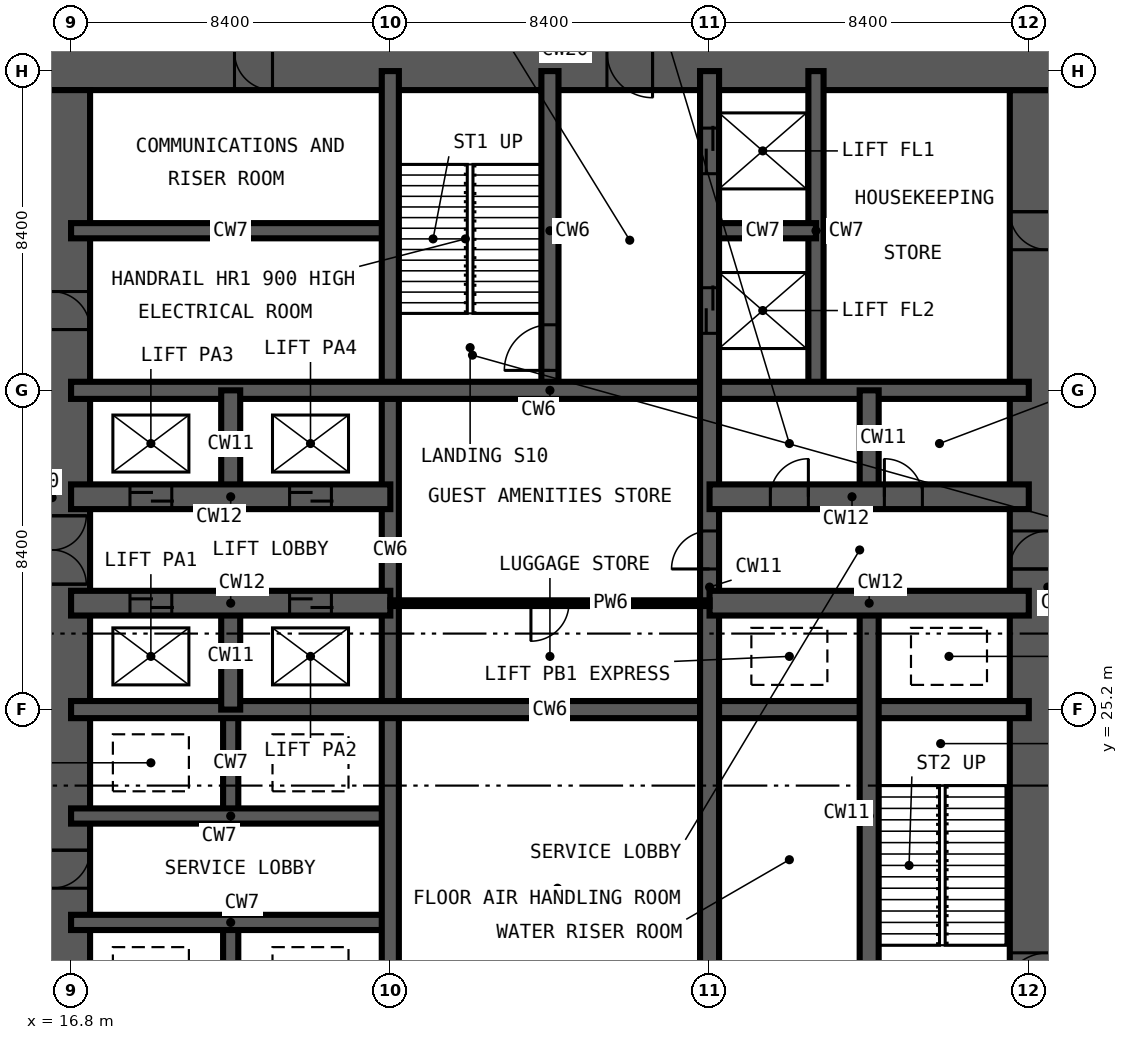
"""IFC4 building model, lengths in metres.
Left out: names, types, materials, properties, quantities, classifications, styles, units other than length and angle.
Written with IfcOpenShell. Run it as: python <this file> out.ifc"""

import sys

from ifc_helpers import new_model, si_unit, direction, frame, frame_2d, origin, place, context, subcontext, project, spatial, rectangle, extrude, element, fill, save


model = new_model("IFC4")
c1 = context("Model", 3, precision=1e-05, world=origin(), true_north=direction((0.0, 1.0)))
c2 = subcontext(c1, "Body", "Model", "MODEL_VIEW")
j1 = project(units=[si_unit("LENGTHUNIT", "METRE"), si_unit("PLANEANGLEUNIT", "RADIAN")], contexts=[c1])
p1 = place(None, origin())
s1 = spatial("IfcSite", under=j1, at=p1, CompositionType="ELEMENT")
p2 = place(p1, origin())
s2 = spatial("IfcBuilding", under=s1, at=p2, CompositionType="ELEMENT")
p3 = place(p2, frame((0.0, 0.0, 12.0)))
s3 = spatial("IfcBuildingStorey", under=s2, at=p3, CompositionType="ELEMENT", Elevation=12.0)
p4 = place(p3, frame((42.5, 17.3, -0.3), z_axis=(0.0, 0.0, 1.0), x_axis=(0.0, 1.0, 0.0)))
e1 = element("IfcWall", 1, at=p4, inside=s3, PredefinedType="SHEAR", context=c2, shape_type="SweptSolid", body=[
    extrude(rectangle(XDim=24.2, YDim=2.0, at=frame_2d((12.1, 0.0))), origin(), (0.0, 0.0, 1.0), 5.0),
])
p5 = place(p4, frame((0.3, 0.0, 0.3)))
e2 = element("IfcOpeningElement", 2, at=p5, cuts=e1, PredefinedType="OPENING", context=c2, shape_type="SweptSolid", body=[
    extrude(rectangle(XDim=1.2, YDim=2.2, at=frame_2d((0.6, 1.1))), frame((0.0, 1.01, 0.0), z_axis=(0.0, -1.0, 0.0), x_axis=(1.0, 0.0, 0.0)), (0.0, 0.0, 1.0), 2.02),
])
p6 = place(p4, frame((11.6, 0.0, 0.3)))
e3 = element("IfcOpeningElement", 3, at=p6, cuts=e1, PredefinedType="OPENING", context=c2, shape_type="SweptSolid", body=[
    extrude(rectangle(XDim=1.0, YDim=2.1, at=frame_2d((0.5, 1.05))), frame((0.0, 1.01, 0.0), z_axis=(0.0, -1.0, 0.0), x_axis=(1.0, 0.0, 0.0)), (0.0, 0.0, 1.0), 2.02),
])
p7 = place(p4, frame((20.0, 0.0, 0.3)))
e4 = element("IfcOpeningElement", 4, at=p7, cuts=e1, PredefinedType="OPENING", context=c2, shape_type="SweptSolid", body=[
    extrude(rectangle(XDim=1.0, YDim=2.1, at=frame_2d((0.5, 1.05))), frame((0.0, 1.01, 0.0), z_axis=(0.0, -1.0, 0.0), x_axis=(1.0, 0.0, 0.0)), (0.0, 0.0, 1.0), 2.02),
])
p8 = place(p3, frame((43.5, 42.5, -0.3), z_axis=(0.0, 0.0, 1.0), x_axis=(-1.0, 0.0, 0.0)))
e5 = element("IfcWall", 5, at=p8, inside=s3, PredefinedType="SHEAR", context=c2, shape_type="SweptSolid", body=[
    extrude(rectangle(XDim=28.2, YDim=2.0, at=frame_2d((14.1, 0.0))), origin(), (0.0, 0.0, 1.0), 5.0),
])
p9 = place(p8, frame((21.4, 0.0, 0.3)))
e6 = element("IfcOpeningElement", 6, at=p9, cuts=e5, PredefinedType="OPENING", context=c2, shape_type="SweptSolid", body=[
    extrude(rectangle(XDim=1.0, YDim=2.1, at=frame_2d((0.5, 1.05))), frame((0.0, 1.01, 0.0), z_axis=(0.0, -1.0, 0.0), x_axis=(1.0, 0.0, 0.0)), (0.0, 0.0, 1.0), 2.02),
])
p10 = place(p8, frame((11.4, 0.0, 0.3)))
e7 = element("IfcOpeningElement", 7, at=p10, cuts=e5, PredefinedType="OPENING", context=c2, shape_type="SweptSolid", body=[
    extrude(rectangle(XDim=1.2, YDim=2.2, at=frame_2d((0.6, 1.1))), frame((0.0, 1.01, 0.0), z_axis=(0.0, -1.0, 0.0), x_axis=(1.0, 0.0, 0.0)), (0.0, 0.0, 1.0), 2.02),
])
p11 = place(p3, frame((16.3, 41.5, -0.3), z_axis=(0.0, 0.0, 1.0), x_axis=(0.0, -1.0, 0.0)))
e8 = element("IfcWall", 8, at=p11, inside=s3, PredefinedType="SHEAR", context=c2, shape_type="SweptSolid", body=[
    extrude(rectangle(XDim=24.2, YDim=2.0, at=frame_2d((12.1, 0.0))), origin(), (0.0, 0.0, 1.0), 5.0),
])
p12 = place(p11, frame((11.2, 0.0, 0.3)))
e9 = element("IfcOpeningElement", 9, at=p12, cuts=e8, PredefinedType="OPENING", context=c2, shape_type="SweptSolid", body=[
    extrude(rectangle(XDim=1.8, YDim=2.2, at=frame_2d((0.9, 1.1))), frame((0.0, 1.01, 0.0), z_axis=(0.0, -1.0, 0.0), x_axis=(1.0, 0.0, 0.0)), (0.0, 0.0, 1.0), 2.02),
])
p13 = place(p11, frame((20.0, 0.0, 0.3)))
e10 = element("IfcOpeningElement", 10, at=p13, cuts=e8, PredefinedType="OPENING", context=c2, shape_type="SweptSolid", body=[
    extrude(rectangle(XDim=1.0, YDim=2.1, at=frame_2d((0.5, 1.05))), frame((0.0, 1.01, 0.0), z_axis=(0.0, -1.0, 0.0), x_axis=(1.0, 0.0, 0.0)), (0.0, 0.0, 1.0), 2.02),
])
p14 = place(p11, frame((5.3, 0.0, 0.3)))
e11 = element("IfcOpeningElement", 11, at=p14, cuts=e8, PredefinedType="OPENING", context=c2, shape_type="SweptSolid", body=[
    extrude(rectangle(XDim=1.0, YDim=2.1, at=frame_2d((0.5, 1.05))), frame((0.0, 1.01, 0.0), z_axis=(0.0, -1.0, 0.0), x_axis=(1.0, 0.0, 0.0)), (0.0, 0.0, 1.0), 2.02),
])
for number, where, z_axis, x_axis in (
    (12, (21.0, 16.8, -0.3), (0.0, 0.0, 1.0), (0.0, 1.0, 0.0)),
    (13, (21.0, 22.4, -0.3), (0.0, 0.0, 1.0), (0.0, 1.0, 0.0)),
):
    element("IfcWall", number, at=place(p3, frame(where, z_axis=z_axis, x_axis=x_axis)), inside=s3, PredefinedType="SHEAR", context=c2, shape_type="SweptSolid", body=[
        extrude(rectangle(XDim=2.8, YDim=0.4, at=frame_2d((1.4, 0.0))), origin(), (0.0, 0.0, 1.0), 5.0),
    ])
for number, where, z_axis, x_axis in (
    (14, (36.4, 33.6, -0.3), (0.0, 0.0, 1.0), (0.0, 1.0, 0.0)),
    (15, (16.8, 19.6, -0.3), (0.0, 0.0, 1.0), (1.0, 0.0, 0.0)),
    (16, (16.8, 22.4, -0.3), (0.0, 0.0, 1.0), (1.0, 0.0, 0.0)),
    (17, (16.8, 37.8, -0.3), (0.0, 0.0, 1.0), (1.0, 0.0, 0.0)),
):
    element("IfcWall", number, at=place(p3, frame(where, z_axis=z_axis, x_axis=x_axis)), inside=s3, PredefinedType="SHEAR", context=c2, shape_type="SweptSolid", body=[
        extrude(rectangle(XDim=8.4, YDim=0.4, at=frame_2d((4.2, 0.0))), origin(), (0.0, 0.0, 1.0), 5.0),
    ])
p15 = place(p3, frame((33.6, 37.8, -0.3), z_axis=(0.0, 0.0, 1.0), x_axis=(1.0, 0.0, 0.0)))
e18 = element("IfcWall", 18, at=p15, inside=s3, PredefinedType="SHEAR", context=c2, shape_type="SweptSolid", body=[
    extrude(rectangle(XDim=2.8, YDim=0.4, at=frame_2d((1.4, 0.0))), origin(), (0.0, 0.0, 1.0), 5.0),
])
p16 = place(p3, frame((25.2, 16.8, -0.3), z_axis=(0.0, 0.0, 1.0), x_axis=(0.0, 1.0, 0.0)))
e19 = element("IfcWall", 19, at=p16, inside=s3, PredefinedType="SHEAR", context=c2, shape_type="SweptSolid", body=[
    extrude(rectangle(XDim=25.2, YDim=0.45, at=frame_2d((12.6, 0.0))), origin(), (0.0, 0.0, 1.0), 5.0),
])
p17 = place(p3, frame((29.4, 33.6, -0.3), z_axis=(0.0, 0.0, 1.0), x_axis=(0.0, 1.0, 0.0)))
e20 = element("IfcWall", 20, at=p17, inside=s3, PredefinedType="SHEAR", context=c2, shape_type="SweptSolid", body=[
    extrude(rectangle(XDim=8.4, YDim=0.45, at=frame_2d((4.2, 0.0))), origin(), (0.0, 0.0, 1.0), 5.0),
])
p18 = place(p17, frame((0.525, 0.0, 0.3)))
e21 = element("IfcOpeningElement", 21, at=p18, cuts=e20, PredefinedType="OPENING", context=c2, shape_type="SweptSolid", body=[
    extrude(rectangle(XDim=1.2, YDim=2.2, at=frame_2d((0.6, 1.1))), frame((0.0, 0.235, 0.0), z_axis=(0.0, -1.0, 0.0), x_axis=(1.0, 0.0, 0.0)), (0.0, 0.0, 1.0), 0.47),
])
for number, where, z_axis, x_axis in (
    (22, (16.8, 25.2, -0.3), (0.0, 0.0, 1.0), (1.0, 0.0, 0.0)),
    (23, (16.8, 33.6, -0.3), (0.0, 0.0, 1.0), (1.0, 0.0, 0.0)),
):
    element("IfcWall", number, at=place(p3, frame(where, z_axis=z_axis, x_axis=x_axis)), inside=s3, PredefinedType="SHEAR", context=c2, shape_type="SweptSolid", body=[
        extrude(rectangle(XDim=25.2, YDim=0.45, at=frame_2d((12.6, 0.0))), origin(), (0.0, 0.0, 1.0), 5.0),
    ])
for number, where, z_axis, x_axis in (
    (24, (21.0, 25.2, -0.3), (0.0, 0.0, 1.0), (0.0, 1.0, 0.0)),
    (25, (21.0, 30.8, -0.3), (0.0, 0.0, 1.0), (0.0, 1.0, 0.0)),
):
    element("IfcWall", number, at=place(p3, frame(where, z_axis=z_axis, x_axis=x_axis)), inside=s3, PredefinedType="SHEAR", context=c2, shape_type="SweptSolid", body=[
        extrude(rectangle(XDim=2.8, YDim=0.5, at=frame_2d((1.4, 0.0))), origin(), (0.0, 0.0, 1.0), 5.0),
    ])
p19 = place(p3, frame((33.6, 16.8, -0.3), z_axis=(0.0, 0.0, 1.0), x_axis=(0.0, 1.0, 0.0)))
e26 = element("IfcWall", 26, at=p19, inside=s3, PredefinedType="SHEAR", context=c2, shape_type="SweptSolid", body=[
    extrude(rectangle(XDim=25.2, YDim=0.5, at=frame_2d((12.6, 0.0))), origin(), (0.0, 0.0, 1.0), 5.0),
])
p20 = place(p19, frame((22.5, 0.0, 0.3)))
e27 = element("IfcOpeningElement", 27, at=p20, cuts=e26, PredefinedType="OPENING", context=c2, shape_type="SweptSolid", body=[
    extrude(rectangle(XDim=1.2, YDim=2.2, at=frame_2d((0.6, 1.1))), frame((0.0, 0.26, 0.0), z_axis=(0.0, -1.0, 0.0), x_axis=(1.0, 0.0, 0.0)), (0.0, 0.0, 1.0), 0.52),
])
p21 = place(p19, frame((18.3, 0.0, 0.3)))
e28 = element("IfcOpeningElement", 28, at=p21, cuts=e26, PredefinedType="OPENING", context=c2, shape_type="SweptSolid", body=[
    extrude(rectangle(XDim=1.2, YDim=2.2, at=frame_2d((0.6, 1.1))), frame((0.0, 0.26, 0.0), z_axis=(0.0, -1.0, 0.0), x_axis=(1.0, 0.0, 0.0)), (0.0, 0.0, 1.0), 0.52),
])
p22 = place(p19, frame((12.1, 0.0, 0.3)))
e29 = element("IfcOpeningElement", 29, at=p22, cuts=e26, PredefinedType="OPENING", context=c2, shape_type="SweptSolid", body=[
    extrude(rectangle(XDim=1.0, YDim=2.1, at=frame_2d((0.5, 1.05))), frame((0.0, 0.26, 0.0), z_axis=(0.0, -1.0, 0.0), x_axis=(1.0, 0.0, 0.0)), (0.0, 0.0, 1.0), 0.52),
])
p23 = place(p3, frame((37.8, 16.8, -0.3), z_axis=(0.0, 0.0, 1.0), x_axis=(0.0, 1.0, 0.0)))
e30 = element("IfcWall", 30, at=p23, inside=s3, PredefinedType="SHEAR", context=c2, shape_type="SweptSolid", body=[
    extrude(rectangle(XDim=11.2, YDim=0.5, at=frame_2d((5.6, 0.0))), origin(), (0.0, 0.0, 1.0), 5.0),
])
p24 = place(p3, frame((37.8, 30.8, -0.3), z_axis=(0.0, 0.0, 1.0), x_axis=(0.0, 1.0, 0.0)))
e31 = element("IfcWall", 31, at=p24, inside=s3, PredefinedType="SHEAR", context=c2, shape_type="SweptSolid", body=[
    extrude(rectangle(XDim=2.8, YDim=0.5, at=frame_2d((1.4, 0.0))), origin(), (0.0, 0.0, 1.0), 5.0),
])
p25 = place(p3, frame((16.8, 28.0, -0.3), z_axis=(0.0, 0.0, 1.0), x_axis=(1.0, 0.0, 0.0)))
e32 = element("IfcWall", 32, at=p25, inside=s3, PredefinedType="SHEAR", context=c2, shape_type="SweptSolid", body=[
    extrude(rectangle(XDim=8.4, YDim=0.65, at=frame_2d((4.2, 0.0))), origin(), (0.0, 0.0, 1.0), 5.0),
])
p26 = place(p25, frame((1.55, 0.0, 0.3)))
e33 = element("IfcOpeningElement", 33, at=p26, cuts=e32, PredefinedType="OPENING", context=c2, shape_type="SweptSolid", body=[
    extrude(rectangle(XDim=1.1, YDim=2.2, at=frame_2d((0.55, 1.1))), frame((0.0, 0.335, 0.0), z_axis=(0.0, -1.0, 0.0), x_axis=(1.0, 0.0, 0.0)), (0.0, 0.0, 1.0), 0.67),
])
p27 = place(p25, frame((5.75, 0.0, 0.3)))
e34 = element("IfcOpeningElement", 34, at=p27, cuts=e32, PredefinedType="OPENING", context=c2, shape_type="SweptSolid", body=[
    extrude(rectangle(XDim=1.1, YDim=2.2, at=frame_2d((0.55, 1.1))), frame((0.0, 0.335, 0.0), z_axis=(0.0, -1.0, 0.0), x_axis=(1.0, 0.0, 0.0)), (0.0, 0.0, 1.0), 0.67),
])
p28 = place(p3, frame((33.6, 28.0, -0.3), z_axis=(0.0, 0.0, 1.0), x_axis=(1.0, 0.0, 0.0)))
e35 = element("IfcWall", 35, at=p28, inside=s3, PredefinedType="SHEAR", context=c2, shape_type="SweptSolid", body=[
    extrude(rectangle(XDim=8.4, YDim=0.65, at=frame_2d((4.2, 0.0))), origin(), (0.0, 0.0, 1.0), 5.0),
])
p29 = place(p3, frame((16.8, 30.8, -0.3), z_axis=(0.0, 0.0, 1.0), x_axis=(1.0, 0.0, 0.0)))
e36 = element("IfcWall", 36, at=p29, inside=s3, PredefinedType="SHEAR", context=c2, shape_type="SweptSolid", body=[
    extrude(rectangle(XDim=8.4, YDim=0.65, at=frame_2d((4.2, 0.0))), origin(), (0.0, 0.0, 1.0), 5.0),
])
p30 = place(p29, frame((1.55, 0.0, 0.3)))
e37 = element("IfcOpeningElement", 37, at=p30, cuts=e36, PredefinedType="OPENING", context=c2, shape_type="SweptSolid", body=[
    extrude(rectangle(XDim=1.1, YDim=2.2, at=frame_2d((0.55, 1.1))), frame((0.0, 0.335, 0.0), z_axis=(0.0, -1.0, 0.0), x_axis=(1.0, 0.0, 0.0)), (0.0, 0.0, 1.0), 0.67),
])
p31 = place(p29, frame((5.75, 0.0, 0.3)))
e38 = element("IfcOpeningElement", 38, at=p31, cuts=e36, PredefinedType="OPENING", context=c2, shape_type="SweptSolid", body=[
    extrude(rectangle(XDim=1.1, YDim=2.2, at=frame_2d((0.55, 1.1))), frame((0.0, 0.335, 0.0), z_axis=(0.0, -1.0, 0.0), x_axis=(1.0, 0.0, 0.0)), (0.0, 0.0, 1.0), 0.67),
])
p32 = place(p3, frame((33.6, 30.8, -0.3), z_axis=(0.0, 0.0, 1.0), x_axis=(1.0, 0.0, 0.0)))
e39 = element("IfcWall", 39, at=p32, inside=s3, PredefinedType="SHEAR", context=c2, shape_type="SweptSolid", body=[
    extrude(rectangle(XDim=8.4, YDim=0.65, at=frame_2d((4.2, 0.0))), origin(), (0.0, 0.0, 1.0), 5.0),
])
p33 = place(p32, frame((1.6, 0.0, 0.3)))
e40 = element("IfcOpeningElement", 40, at=p33, cuts=e39, PredefinedType="OPENING", context=c2, shape_type="SweptSolid", body=[
    extrude(rectangle(XDim=1.0, YDim=2.1, at=frame_2d((0.5, 1.05))), frame((0.0, 0.335, 0.0), z_axis=(0.0, -1.0, 0.0), x_axis=(1.0, 0.0, 0.0)), (0.0, 0.0, 1.0), 0.67),
])
p34 = place(p32, frame((4.6, 0.0, 0.3)))
e41 = element("IfcOpeningElement", 41, at=p34, cuts=e39, PredefinedType="OPENING", context=c2, shape_type="SweptSolid", body=[
    extrude(rectangle(XDim=1.0, YDim=2.1, at=frame_2d((0.5, 1.05))), frame((0.0, 0.335, 0.0), z_axis=(0.0, -1.0, 0.0), x_axis=(1.0, 0.0, 0.0)), (0.0, 0.0, 1.0), 0.67),
])
p35 = place(p3, frame((25.2, 28.0, 0.0), z_axis=(0.0, 0.0, 1.0), x_axis=(1.0, 0.0, 0.0)))
e42 = element("IfcWall", 42, at=p35, inside=s3, PredefinedType="PARTITIONING", context=c2, shape_type="SweptSolid", body=[
    extrude(rectangle(XDim=8.4, YDim=0.15, at=frame_2d((4.2, 0.0))), origin(), (0.0, 0.0, 1.0), 4.7),
])
p36 = place(p35, frame((3.7, 0.0, 0.0)))
e43 = element("IfcOpeningElement", 43, at=p36, cuts=e42, PredefinedType="OPENING", context=c2, shape_type="SweptSolid", body=[
    extrude(rectangle(XDim=1.0, YDim=2.1, at=frame_2d((0.5, 1.05))), frame((0.0, 0.085, 0.0), z_axis=(0.0, -1.0, 0.0), x_axis=(1.0, 0.0, 0.0)), (0.0, 0.0, 1.0), 0.17),
])
p37 = place(p18, origin())
e44 = element("IfcDoor", 44, at=p37, inside=s3, OperationType="SINGLE_SWING_LEFT", PredefinedType="DOOR", context=c2, shape_type="SweptSolid", body=[
    extrude(rectangle(XDim=1.2, YDim=2.2, at=frame_2d((0.6, 1.1))), frame((0.0, 0.025, 0.0), z_axis=(0.0, -1.0, 0.0), x_axis=(1.0, 0.0, 0.0)), (0.0, 0.0, 1.0), 0.05),
])
fill(e21, e44)
p38 = place(p5, origin())
e45 = element("IfcDoor", 45, at=p38, inside=s3, OperationType="SINGLE_SWING_LEFT", PredefinedType="DOOR", context=c2, shape_type="SweptSolid", body=[
    extrude(rectangle(XDim=1.2, YDim=2.2, at=frame_2d((0.6, 1.1))), frame((0.0, 0.025, 0.0), z_axis=(0.0, -1.0, 0.0), x_axis=(1.0, 0.0, 0.0)), (0.0, 0.0, 1.0), 0.05),
])
fill(e2, e45)
p39 = place(p26, origin())
e46 = element("IfcDoor", 46, at=p39, inside=s3, OperationType="DOUBLE_DOOR_SLIDING", PredefinedType="DOOR", context=c2, shape_type="SweptSolid", body=[
    extrude(rectangle(XDim=1.1, YDim=2.2, at=frame_2d((0.55, 1.1))), frame((0.0, 0.025, 0.0), z_axis=(0.0, -1.0, 0.0), x_axis=(1.0, 0.0, 0.0)), (0.0, 0.0, 1.0), 0.05),
])
fill(e33, e46)
p40 = place(p27, origin())
e47 = element("IfcDoor", 47, at=p40, inside=s3, OperationType="DOUBLE_DOOR_SLIDING", PredefinedType="DOOR", context=c2, shape_type="SweptSolid", body=[
    extrude(rectangle(XDim=1.1, YDim=2.2, at=frame_2d((0.55, 1.1))), frame((0.0, 0.025, 0.0), z_axis=(0.0, -1.0, 0.0), x_axis=(1.0, 0.0, 0.0)), (0.0, 0.0, 1.0), 0.05),
])
fill(e34, e47)
p41 = place(p30, origin())
e48 = element("IfcDoor", 48, at=p41, inside=s3, OperationType="DOUBLE_DOOR_SLIDING", PredefinedType="DOOR", context=c2, shape_type="SweptSolid", body=[
    extrude(rectangle(XDim=1.1, YDim=2.2, at=frame_2d((0.55, 1.1))), frame((0.0, 0.025, 0.0), z_axis=(0.0, -1.0, 0.0), x_axis=(1.0, 0.0, 0.0)), (0.0, 0.0, 1.0), 0.05),
])
fill(e37, e48)
p42 = place(p31, origin())
e49 = element("IfcDoor", 49, at=p42, inside=s3, OperationType="DOUBLE_DOOR_SLIDING", PredefinedType="DOOR", context=c2, shape_type="SweptSolid", body=[
    extrude(rectangle(XDim=1.1, YDim=2.2, at=frame_2d((0.55, 1.1))), frame((0.0, 0.025, 0.0), z_axis=(0.0, -1.0, 0.0), x_axis=(1.0, 0.0, 0.0)), (0.0, 0.0, 1.0), 0.05),
])
fill(e38, e49)
p43 = place(p20, origin())
e50 = element("IfcDoor", 50, at=p43, inside=s3, OperationType="DOUBLE_DOOR_SLIDING", PredefinedType="DOOR", context=c2, shape_type="SweptSolid", body=[
    extrude(rectangle(XDim=1.2, YDim=2.2, at=frame_2d((0.6, 1.1))), frame((0.0, 0.025, 0.0), z_axis=(0.0, -1.0, 0.0), x_axis=(1.0, 0.0, 0.0)), (0.0, 0.0, 1.0), 0.05),
])
fill(e27, e50)
p44 = place(p21, origin())
e51 = element("IfcDoor", 51, at=p44, inside=s3, OperationType="DOUBLE_DOOR_SLIDING", PredefinedType="DOOR", context=c2, shape_type="SweptSolid", body=[
    extrude(rectangle(XDim=1.2, YDim=2.2, at=frame_2d((0.6, 1.1))), frame((0.0, 0.025, 0.0), z_axis=(0.0, -1.0, 0.0), x_axis=(1.0, 0.0, 0.0)), (0.0, 0.0, 1.0), 0.05),
])
fill(e28, e51)
p45 = place(p12, origin())
e52 = element("IfcDoor", 52, at=p45, inside=s3, OperationType="DOUBLE_DOOR_DOUBLE_SWING", PredefinedType="DOOR", context=c2, shape_type="SweptSolid", body=[
    extrude(rectangle(XDim=1.8, YDim=2.2, at=frame_2d((0.9, 1.1))), frame((0.0, 0.025, 0.0), z_axis=(0.0, -1.0, 0.0), x_axis=(1.0, 0.0, 0.0)), (0.0, 0.0, 1.0), 0.05),
])
fill(e9, e52)
p46 = place(p13, origin())
e53 = element("IfcDoor", 53, at=p46, inside=s3, OperationType="SINGLE_SWING_LEFT", PredefinedType="DOOR", context=c2, shape_type="SweptSolid", body=[
    extrude(rectangle(XDim=1.0, YDim=2.1, at=frame_2d((0.5, 1.05))), frame((0.0, 0.025, 0.0), z_axis=(0.0, -1.0, 0.0), x_axis=(1.0, 0.0, 0.0)), (0.0, 0.0, 1.0), 0.05),
])
fill(e10, e53)
p47 = place(p14, origin())
e54 = element("IfcDoor", 54, at=p47, inside=s3, OperationType="SINGLE_SWING_RIGHT", PredefinedType="DOOR", context=c2, shape_type="SweptSolid", body=[
    extrude(rectangle(XDim=1.0, YDim=2.1, at=frame_2d((0.5, 1.05))), frame((0.0, 0.025, 0.0), z_axis=(0.0, -1.0, 0.0), x_axis=(1.0, 0.0, 0.0)), (0.0, 0.0, 1.0), 0.05),
])
fill(e11, e54)
p48 = place(p9, origin())
e55 = element("IfcDoor", 55, at=p48, inside=s3, OperationType="SINGLE_SWING_LEFT", PredefinedType="DOOR", context=c2, shape_type="SweptSolid", body=[
    extrude(rectangle(XDim=1.0, YDim=2.1, at=frame_2d((0.5, 1.05))), frame((0.0, 0.025, 0.0), z_axis=(0.0, -1.0, 0.0), x_axis=(1.0, 0.0, 0.0)), (0.0, 0.0, 1.0), 0.05),
])
fill(e6, e55)
p49 = place(p22, origin())
e56 = element("IfcDoor", 56, at=p49, inside=s3, OperationType="SINGLE_SWING_LEFT", PredefinedType="DOOR", context=c2, shape_type="SweptSolid", body=[
    extrude(rectangle(XDim=1.0, YDim=2.1, at=frame_2d((0.5, 1.05))), frame((0.0, 0.025, 0.0), z_axis=(0.0, -1.0, 0.0), x_axis=(1.0, 0.0, 0.0)), (0.0, 0.0, 1.0), 0.05),
])
fill(e29, e56)
p50 = place(p36, frame((1.0, 0.0, 0.0), z_axis=(0.0, 0.0, 1.0), x_axis=(-1.0, 0.0, 0.0)))
e57 = element("IfcDoor", 57, at=p50, inside=s3, OperationType="SINGLE_SWING_RIGHT", PredefinedType="DOOR", context=c2, shape_type="SweptSolid", body=[
    extrude(rectangle(XDim=1.0, YDim=2.1, at=frame_2d((0.5, 1.05))), frame((0.0, 0.025, 0.0), z_axis=(0.0, -1.0, 0.0), x_axis=(1.0, 0.0, 0.0)), (0.0, 0.0, 1.0), 0.05),
])
fill(e43, e57)
p51 = place(p33, origin())
e58 = element("IfcDoor", 58, at=p51, inside=s3, OperationType="SINGLE_SWING_RIGHT", PredefinedType="DOOR", context=c2, shape_type="SweptSolid", body=[
    extrude(rectangle(XDim=1.0, YDim=2.1, at=frame_2d((0.5, 1.05))), frame((0.0, 0.025, 0.0), z_axis=(0.0, -1.0, 0.0), x_axis=(1.0, 0.0, 0.0)), (0.0, 0.0, 1.0), 0.05),
])
fill(e40, e58)
p52 = place(p34, origin())
e59 = element("IfcDoor", 59, at=p52, inside=s3, OperationType="SINGLE_SWING_LEFT", PredefinedType="DOOR", context=c2, shape_type="SweptSolid", body=[
    extrude(rectangle(XDim=1.0, YDim=2.1, at=frame_2d((0.5, 1.05))), frame((0.0, 0.025, 0.0), z_axis=(0.0, -1.0, 0.0), x_axis=(1.0, 0.0, 0.0)), (0.0, 0.0, 1.0), 0.05),
])
fill(e41, e59)
p53 = place(p6, origin())
e60 = element("IfcDoor", 60, at=p53, inside=s3, OperationType="SINGLE_SWING_LEFT", PredefinedType="DOOR", context=c2, shape_type="SweptSolid", body=[
    extrude(rectangle(XDim=1.0, YDim=2.1, at=frame_2d((0.5, 1.05))), frame((0.0, 0.025, 0.0), z_axis=(0.0, -1.0, 0.0), x_axis=(1.0, 0.0, 0.0)), (0.0, 0.0, 1.0), 0.05),
])
fill(e3, e60)
p54 = place(p10, origin())
e61 = element("IfcDoor", 61, at=p54, inside=s3, OperationType="SINGLE_SWING_LEFT", PredefinedType="DOOR", context=c2, shape_type="SweptSolid", body=[
    extrude(rectangle(XDim=1.2, YDim=2.2, at=frame_2d((0.6, 1.1))), frame((0.0, 0.025, 0.0), z_axis=(0.0, -1.0, 0.0), x_axis=(1.0, 0.0, 0.0)), (0.0, 0.0, 1.0), 0.05),
])
fill(e7, e61)
p55 = place(p7, origin())
e62 = element("IfcDoor", 62, at=p55, inside=s3, OperationType="SINGLE_SWING_RIGHT", PredefinedType="DOOR", context=c2, shape_type="SweptSolid", body=[
    extrude(rectangle(XDim=1.0, YDim=2.1, at=frame_2d((0.5, 1.05))), frame((0.0, 0.025, 0.0), z_axis=(0.0, -1.0, 0.0), x_axis=(1.0, 0.0, 0.0)), (0.0, 0.0, 1.0), 0.05),
])
fill(e4, e62)
save(model, sys.argv[1])
